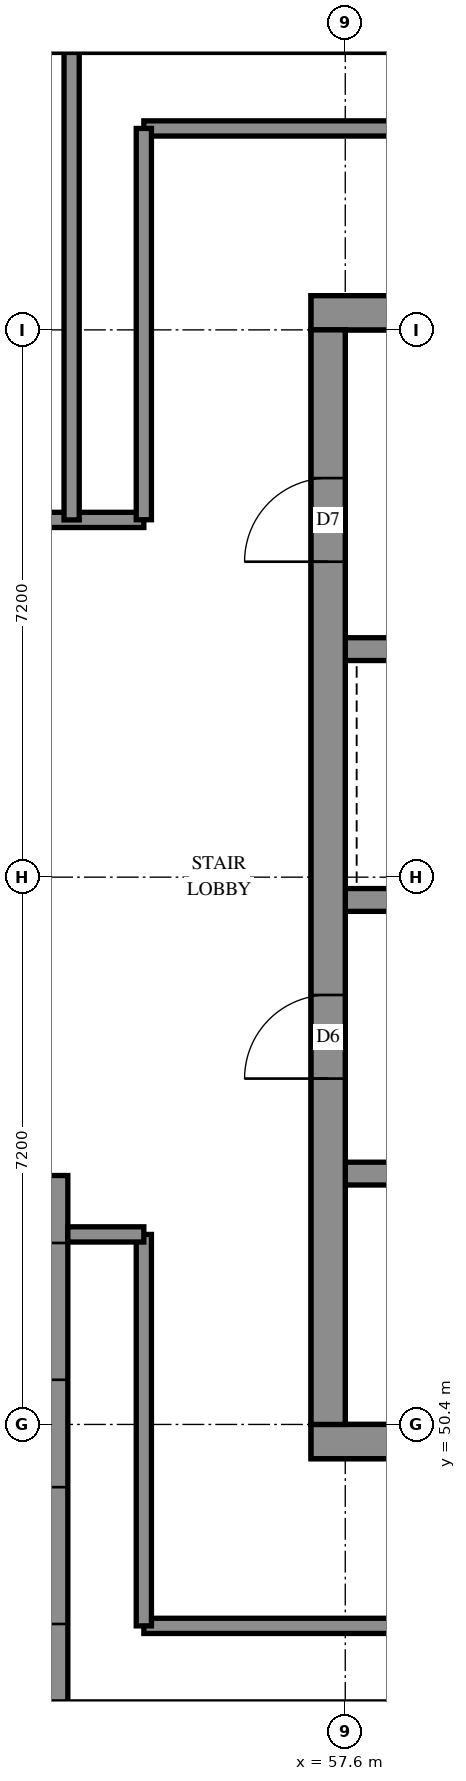
"""IFC4 building model, lengths in metres.
Left out: names, types, materials, properties, quantities, classifications, styles, units other than length and angle.
Written with IfcOpenShell. Run it as: python <this file> out.ifc"""

import sys

from ifc_helpers import new_model, si_unit, direction, frame, frame_2d, origin, place, context, subcontext, project, spatial, polyline, rectangle, outline, extrude, element, fill, save


model = new_model("IFC4")
c1 = context("Model", 3, precision=1e-05, world=origin(), true_north=direction((0.0, 1.0)))
c2 = subcontext(c1, "Body", "Model", "MODEL_VIEW")
j1 = project(units=[si_unit("LENGTHUNIT", "METRE"), si_unit("PLANEANGLEUNIT", "RADIAN")], contexts=[c1])
p1 = place(None, origin())
s1 = spatial("IfcSite", under=j1, at=p1, CompositionType="ELEMENT")
p2 = place(p1, origin())
s2 = spatial("IfcBuilding", under=s1, at=p2, CompositionType="ELEMENT")
p3 = place(p2, frame((0.0, 0.0, 234.6)))
s3 = spatial("IfcBuildingStorey", under=s2, at=p3, CompositionType="ELEMENT", Elevation=234.6)
p4 = place(p3, frame((57.15, 50.175, -0.3), z_axis=(0.0, 0.0, 1.0), x_axis=(1.0, 0.0, 0.0)))
e1 = element("IfcWall", 1, at=p4, inside=s3, PredefinedType="SHEAR", context=c2, shape_type="SweptSolid", body=[
    extrude(rectangle(XDim=15.3, YDim=0.45, at=frame_2d((7.65, 0.0))), origin(), (0.0, 0.0, 1.0), 4.3),
])
p5 = place(p3, frame((57.15, 65.025, -0.3), z_axis=(0.0, 0.0, 1.0), x_axis=(1.0, 0.0, 0.0)))
e2 = element("IfcWall", 2, at=p5, inside=s3, PredefinedType="SHEAR", context=c2, shape_type="SweptSolid", body=[
    extrude(rectangle(XDim=15.3, YDim=0.45, at=frame_2d((7.65, 0.0))), origin(), (0.0, 0.0, 1.0), 4.3),
])
p6 = place(p5, frame((10.45, 0.0, 0.3)))
e3 = element("IfcOpeningElement", 3, at=p6, cuts=e2, PredefinedType="OPENING", context=c2, shape_type="SweptSolid", body=[
    extrude(rectangle(XDim=0.8, YDim=2.1, at=frame_2d((0.4, 1.05))), frame((0.0, 0.235, 0.0), z_axis=(0.0, -1.0, 0.0), x_axis=(1.0, 0.0, 0.0)), (0.0, 0.0, 1.0), 0.47),
])
p7 = place(p3, frame((57.375, 50.4, -0.3), z_axis=(0.0, 0.0, 1.0), x_axis=(0.0, 1.0, 0.0)))
e4 = element("IfcWall", 4, at=p7, inside=s3, PredefinedType="SHEAR", context=c2, shape_type="SweptSolid", body=[
    extrude(rectangle(XDim=14.4, YDim=0.45, at=frame_2d((7.2, 0.0))), origin(), (0.0, 0.0, 1.0), 4.3),
])
p8 = place(p7, frame((4.55, 0.0, 0.3)))
e5 = element("IfcOpeningElement", 5, at=p8, cuts=e4, PredefinedType="OPENING", context=c2, shape_type="SweptSolid", body=[
    extrude(rectangle(XDim=1.1, YDim=2.1, at=frame_2d((0.55, 1.05))), frame((0.0, 0.235, 0.0), z_axis=(0.0, -1.0, 0.0), x_axis=(1.0, 0.0, 0.0)), (0.0, 0.0, 1.0), 0.47),
])
p9 = place(p7, frame((11.35, 0.0, 0.3)))
e6 = element("IfcOpeningElement", 6, at=p9, cuts=e4, PredefinedType="OPENING", context=c2, shape_type="SweptSolid", body=[
    extrude(rectangle(XDim=1.1, YDim=2.1, at=frame_2d((0.55, 1.05))), frame((0.0, 0.235, 0.0), z_axis=(0.0, -1.0, 0.0), x_axis=(1.0, 0.0, 0.0)), (0.0, 0.0, 1.0), 0.47),
])
p10 = place(p3, frame((57.6, 53.7, 0.0), z_axis=(0.0, 0.0, 1.0), x_axis=(1.0, 0.0, 0.0)))
e7 = element("IfcWall", 7, at=p10, inside=s3, PredefinedType="SOLIDWALL", context=c2, shape_type="SweptSolid", body=[
    extrude(rectangle(XDim=14.4, YDim=0.3, at=frame_2d((7.2, 0.0))), origin(), (0.0, 0.0, 1.0), 4.7),
])
p11 = place(p10, frame((1.35, 0.0, 0.0)))
e8 = element("IfcOpeningElement", 8, at=p11, cuts=e7, PredefinedType="OPENING", context=c2, shape_type="SweptSolid", body=[
    extrude(rectangle(XDim=0.9, YDim=2.1, at=frame_2d((0.45, 1.05))), frame((0.0, 0.16, 0.0), z_axis=(0.0, -1.0, 0.0), x_axis=(1.0, 0.0, 0.0)), (0.0, 0.0, 1.0), 0.32),
])
p12 = place(p10, frame((4.95, 0.0, 0.0)))
e9 = element("IfcOpeningElement", 9, at=p12, cuts=e7, PredefinedType="OPENING", context=c2, shape_type="SweptSolid", body=[
    extrude(rectangle(XDim=0.9, YDim=2.1, at=frame_2d((0.45, 1.05))), frame((0.0, 0.16, 0.0), z_axis=(0.0, -1.0, 0.0), x_axis=(1.0, 0.0, 0.0)), (0.0, 0.0, 1.0), 0.32),
])
p13 = place(p10, frame((8.55, 0.0, 0.0)))
e10 = element("IfcOpeningElement", 10, at=p13, cuts=e7, PredefinedType="OPENING", context=c2, shape_type="SweptSolid", body=[
    extrude(rectangle(XDim=0.9, YDim=2.1, at=frame_2d((0.45, 1.05))), frame((0.0, 0.16, 0.0), z_axis=(0.0, -1.0, 0.0), x_axis=(1.0, 0.0, 0.0)), (0.0, 0.0, 1.0), 0.32),
])
p14 = place(p10, frame((12.05, 0.0, 0.0)))
e11 = element("IfcOpeningElement", 11, at=p14, cuts=e7, PredefinedType="OPENING", context=c2, shape_type="SweptSolid", body=[
    extrude(rectangle(XDim=1.1, YDim=2.1, at=frame_2d((0.55, 1.05))), frame((0.0, 0.16, 0.0), z_axis=(0.0, -1.0, 0.0), x_axis=(1.0, 0.0, 0.0)), (0.0, 0.0, 1.0), 0.32),
])
p15 = place(p3, frame((57.6, 57.3, 0.0), z_axis=(0.0, 0.0, 1.0), x_axis=(1.0, 0.0, 0.0)))
e12 = element("IfcWall", 12, at=p15, inside=s3, PredefinedType="SOLIDWALL", context=c2, shape_type="SweptSolid", body=[
    extrude(rectangle(XDim=14.4, YDim=0.3, at=frame_2d((7.2, 0.0))), origin(), (0.0, 0.0, 1.0), 4.7),
])
p16 = place(p15, frame((1.25, 0.0, 0.0)))
e13 = element("IfcOpeningElement", 13, at=p16, cuts=e12, PredefinedType="OPENING", context=c2, shape_type="SweptSolid", body=[
    extrude(rectangle(XDim=1.1, YDim=2.1, at=frame_2d((0.55, 1.05))), frame((0.0, 0.16, 0.0), z_axis=(0.0, -1.0, 0.0), x_axis=(1.0, 0.0, 0.0)), (0.0, 0.0, 1.0), 0.32),
])
p17 = place(p15, frame((4.85, 0.0, 0.0)))
e14 = element("IfcOpeningElement", 14, at=p17, cuts=e12, PredefinedType="OPENING", context=c2, shape_type="SweptSolid", body=[
    extrude(rectangle(XDim=1.1, YDim=2.1, at=frame_2d((0.55, 1.05))), frame((0.0, 0.16, 0.0), z_axis=(0.0, -1.0, 0.0), x_axis=(1.0, 0.0, 0.0)), (0.0, 0.0, 1.0), 0.32),
])
p18 = place(p15, frame((8.45, 0.0, 0.0)))
e15 = element("IfcOpeningElement", 15, at=p18, cuts=e12, PredefinedType="OPENING", context=c2, shape_type="SweptSolid", body=[
    extrude(rectangle(XDim=1.1, YDim=2.1, at=frame_2d((0.55, 1.05))), frame((0.0, 0.16, 0.0), z_axis=(0.0, -1.0, 0.0), x_axis=(1.0, 0.0, 0.0)), (0.0, 0.0, 1.0), 0.32),
])
p19 = place(p15, frame((12.05, 0.0, 0.0)))
e16 = element("IfcOpeningElement", 16, at=p19, cuts=e12, PredefinedType="OPENING", context=c2, shape_type="SweptSolid", body=[
    extrude(rectangle(XDim=1.1, YDim=2.1, at=frame_2d((0.55, 1.05))), frame((0.0, 0.16, 0.0), z_axis=(0.0, -1.0, 0.0), x_axis=(1.0, 0.0, 0.0)), (0.0, 0.0, 1.0), 0.32),
])
p20 = place(p3, frame((57.6, 60.6, 0.0), z_axis=(0.0, 0.0, 1.0), x_axis=(1.0, 0.0, 0.0)))
e17 = element("IfcWall", 17, at=p20, inside=s3, PredefinedType="SOLIDWALL", context=c2, shape_type="SweptSolid", body=[
    extrude(rectangle(XDim=7.2, YDim=0.3, at=frame_2d((3.6, 0.0))), origin(), (0.0, 0.0, 1.0), 4.7),
])
p21 = place(p3, frame((77.844, 68.725, 0.0), z_axis=(0.0, 0.0, 1.0), x_axis=(-1.0, 0.0, 0.0)))
e18 = element("IfcWall", 18, at=p21, inside=s3, PredefinedType="SOLIDWALL", context=c2, shape_type="SweptSolid", body=[
    extrude(outline(polyline([(-0.114, -0.275), (46.044, -0.275), (45.493, 0.275), (0.114, 0.275), (-0.114, -0.275)])), origin(), (0.0, 0.0, 1.0), 4.7),
])
p22 = place(p21, frame((3.193, 0.0, 0.9)))
e19 = element("IfcOpeningElement", 19, at=p22, cuts=e18, PredefinedType="OPENING", context=c2, shape_type="SweptSolid", body=[
    extrude(rectangle(XDim=1.8, YDim=3.6, at=frame_2d((0.9, 1.8))), frame((0.0, 0.285, 0.0), z_axis=(0.0, -1.0, 0.0), x_axis=(1.0, 0.0, 0.0)), (0.0, 0.0, 1.0), 0.57),
])
p23 = place(p21, frame((6.744, 0.0, 0.9)))
e20 = element("IfcOpeningElement", 20, at=p23, cuts=e18, PredefinedType="OPENING", context=c2, shape_type="SweptSolid", body=[
    extrude(rectangle(XDim=1.8, YDim=3.6, at=frame_2d((0.9, 1.8))), frame((0.0, 0.285, 0.0), z_axis=(0.0, -1.0, 0.0), x_axis=(1.0, 0.0, 0.0)), (0.0, 0.0, 1.0), 0.57),
])
p24 = place(p21, frame((10.344, 0.0, 0.9)))
e21 = element("IfcOpeningElement", 21, at=p24, cuts=e18, PredefinedType="OPENING", context=c2, shape_type="SweptSolid", body=[
    extrude(rectangle(XDim=1.8, YDim=3.6, at=frame_2d((0.9, 1.8))), frame((0.0, 0.285, 0.0), z_axis=(0.0, -1.0, 0.0), x_axis=(1.0, 0.0, 0.0)), (0.0, 0.0, 1.0), 0.57),
])
p25 = place(p21, frame((13.944, 0.0, 0.9)))
e22 = element("IfcOpeningElement", 22, at=p25, cuts=e18, PredefinedType="OPENING", context=c2, shape_type="SweptSolid", body=[
    extrude(rectangle(XDim=1.8, YDim=3.6, at=frame_2d((0.9, 1.8))), frame((0.0, 0.285, 0.0), z_axis=(0.0, -1.0, 0.0), x_axis=(1.0, 0.0, 0.0)), (0.0, 0.0, 1.0), 0.57),
])
p26 = place(p21, frame((17.544, 0.0, 0.9)))
e23 = element("IfcOpeningElement", 23, at=p26, cuts=e18, PredefinedType="OPENING", context=c2, shape_type="SweptSolid", body=[
    extrude(rectangle(XDim=1.8, YDim=3.6, at=frame_2d((0.9, 1.8))), frame((0.0, 0.285, 0.0), z_axis=(0.0, -1.0, 0.0), x_axis=(1.0, 0.0, 0.0)), (0.0, 0.0, 1.0), 0.57),
])
p27 = place(p21, frame((21.143, 0.0, 0.9)))
e24 = element("IfcOpeningElement", 24, at=p27, cuts=e18, PredefinedType="OPENING", context=c2, shape_type="SweptSolid", body=[
    extrude(rectangle(XDim=1.8, YDim=3.6, at=frame_2d((0.9, 1.8))), frame((0.0, 0.285, 0.0), z_axis=(0.0, -1.0, 0.0), x_axis=(1.0, 0.0, 0.0)), (0.0, 0.0, 1.0), 0.57),
])
p28 = place(p21, frame((24.744, 0.0, 0.9)))
e25 = element("IfcOpeningElement", 25, at=p28, cuts=e18, PredefinedType="OPENING", context=c2, shape_type="SweptSolid", body=[
    extrude(rectangle(XDim=1.8, YDim=3.6, at=frame_2d((0.9, 1.8))), frame((0.0, 0.285, 0.0), z_axis=(0.0, -1.0, 0.0), x_axis=(1.0, 0.0, 0.0)), (0.0, 0.0, 1.0), 0.57),
])
p29 = place(p21, frame((28.343, 0.0, 0.9)))
e26 = element("IfcOpeningElement", 26, at=p29, cuts=e18, PredefinedType="OPENING", context=c2, shape_type="SweptSolid", body=[
    extrude(rectangle(XDim=1.8, YDim=3.6, at=frame_2d((0.9, 1.8))), frame((0.0, 0.285, 0.0), z_axis=(0.0, -1.0, 0.0), x_axis=(1.0, 0.0, 0.0)), (0.0, 0.0, 1.0), 0.57),
])
p30 = place(p21, frame((31.944, 0.0, 0.9)))
e27 = element("IfcOpeningElement", 27, at=p30, cuts=e18, PredefinedType="OPENING", context=c2, shape_type="SweptSolid", body=[
    extrude(rectangle(XDim=1.8, YDim=3.6, at=frame_2d((0.9, 1.8))), frame((0.0, 0.285, 0.0), z_axis=(0.0, -1.0, 0.0), x_axis=(1.0, 0.0, 0.0)), (0.0, 0.0, 1.0), 0.57),
])
p31 = place(p21, frame((35.544, 0.0, 0.9)))
e28 = element("IfcOpeningElement", 28, at=p31, cuts=e18, PredefinedType="OPENING", context=c2, shape_type="SweptSolid", body=[
    extrude(rectangle(XDim=1.8, YDim=3.6, at=frame_2d((0.9, 1.8))), frame((0.0, 0.285, 0.0), z_axis=(0.0, -1.0, 0.0), x_axis=(1.0, 0.0, 0.0)), (0.0, 0.0, 1.0), 0.57),
])
p32 = place(p3, frame((46.475, 53.675, 0.0), z_axis=(0.0, 0.0, 1.0), x_axis=(1.0, 0.0, 0.0)))
e29 = element("IfcWall", 29, at=p32, inside=s3, PredefinedType="SOLIDWALL", context=c2, shape_type="SweptSolid", body=[
    extrude(outline(polyline([(-0.275, -0.275), (6.925, -0.275), (7.475, 0.275), (0.275, 0.275), (-0.275, -0.275)])), origin(), (0.0, 0.0, 1.0), 4.7),
])
p33 = place(p32, frame((1.3, 0.0, 0.9)))
e30 = element("IfcOpeningElement", 30, at=p33, cuts=e29, PredefinedType="OPENING", context=c2, shape_type="SweptSolid", body=[
    extrude(rectangle(XDim=1.8, YDim=3.6, at=frame_2d((0.9, 1.8))), frame((0.0, 0.285, 0.0), z_axis=(0.0, -1.0, 0.0), x_axis=(1.0, 0.0, 0.0)), (0.0, 0.0, 1.0), 0.57),
])
p34 = place(p32, frame((4.562, 0.0, 0.9)))
e31 = element("IfcOpeningElement", 31, at=p34, cuts=e29, PredefinedType="OPENING", context=c2, shape_type="SweptSolid", body=[
    extrude(rectangle(XDim=1.8, YDim=3.6, at=frame_2d((0.9, 1.8))), frame((0.0, 0.285, 0.0), z_axis=(0.0, -1.0, 0.0), x_axis=(1.0, 0.0, 0.0)), (0.0, 0.0, 1.0), 0.57),
])
p35 = place(p3, frame((53.675, 53.675, 0.0), z_axis=(0.0, 0.0, 1.0), x_axis=(0.0, -1.0, 0.0)))
e32 = element("IfcWall", 32, at=p35, inside=s3, PredefinedType="SOLIDWALL", context=c2, shape_type="SweptSolid", body=[
    extrude(outline(polyline([(0.275, -0.275), (7.475, -0.275), (6.925, 0.275), (-0.275, 0.275), (0.275, -0.275)])), origin(), (0.0, 0.0, 1.0), 4.7),
])
p36 = place(p35, frame((0.887, 0.0, 0.9)))
e33 = element("IfcOpeningElement", 33, at=p36, cuts=e32, PredefinedType="OPENING", context=c2, shape_type="SweptSolid", body=[
    extrude(rectangle(XDim=1.8, YDim=3.6, at=frame_2d((0.9, 1.8))), frame((0.0, 0.285, 0.0), z_axis=(0.0, -1.0, 0.0), x_axis=(1.0, 0.0, 0.0)), (0.0, 0.0, 1.0), 0.57),
])
p37 = place(p35, frame((4.1, 0.0, 0.9)))
e34 = element("IfcOpeningElement", 34, at=p37, cuts=e32, PredefinedType="OPENING", context=c2, shape_type="SweptSolid", body=[
    extrude(rectangle(XDim=1.8, YDim=3.6, at=frame_2d((0.9, 1.8))), frame((0.0, 0.285, 0.0), z_axis=(0.0, -1.0, 0.0), x_axis=(1.0, 0.0, 0.0)), (0.0, 0.0, 1.0), 0.57),
])
p38 = place(p3, frame((54.95, 67.45, 0.0), z_axis=(0.0, 0.0, 1.0), x_axis=(1.0, 0.0, 0.0)))
e35 = element("IfcWall", 35, at=p38, inside=s3, PredefinedType="PARTITIONING", context=c2, shape_type="SweptSolid", body=[
    extrude(rectangle(XDim=19.7, YDim=0.2, at=frame_2d((9.85, 0.0))), origin(), (0.0, 0.0, 1.0), 4.7),
])
p39 = place(p3, frame((54.95, 47.75, 0.0), z_axis=(0.0, 0.0, 1.0), x_axis=(1.0, 0.0, 0.0)))
e36 = element("IfcWall", 36, at=p39, inside=s3, PredefinedType="PARTITIONING", context=c2, shape_type="SweptSolid", body=[
    extrude(rectangle(XDim=19.296, YDim=0.2, at=frame_2d((9.648, 0.0))), origin(), (0.0, 0.0, 1.0), 4.7),
])
p40 = place(p3, frame((40.702, 62.3, 0.0), z_axis=(0.0, 0.0, 1.0), x_axis=(1.0, 0.0, 0.0)))
e37 = element("IfcWall", 37, at=p40, inside=s3, PredefinedType="PARTITIONING", context=c2, shape_type="SweptSolid", body=[
    extrude(rectangle(XDim=14.248, YDim=0.2, at=frame_2d((7.124, 0.0))), origin(), (0.0, 0.0, 1.0), 4.7),
])
p41 = place(p40, frame((6.361, 0.0, 0.0)))
e38 = element("IfcOpeningElement", 38, at=p41, cuts=e37, PredefinedType="OPENING", context=c2, shape_type="SweptSolid", body=[
    extrude(rectangle(XDim=1.0, YDim=2.1, at=frame_2d((0.5, 1.05))), frame((0.0, 0.11, 0.0), z_axis=(0.0, -1.0, 0.0), x_axis=(1.0, 0.0, 0.0)), (0.0, 0.0, 1.0), 0.22),
])
p42 = place(p40, frame((11.79, 0.0, 0.0)))
e39 = element("IfcOpeningElement", 39, at=p42, cuts=e37, PredefinedType="OPENING", context=c2, shape_type="SweptSolid", body=[
    extrude(rectangle(XDim=1.0, YDim=2.1, at=frame_2d((0.5, 1.05))), frame((0.0, 0.11, 0.0), z_axis=(0.0, -1.0, 0.0), x_axis=(1.0, 0.0, 0.0)), (0.0, 0.0, 1.0), 0.22),
])
p43 = place(p3, frame((54.0, 62.3, 0.0), z_axis=(0.0, 0.0, 1.0), x_axis=(0.0, 1.0, 0.0)))
e40 = element("IfcWall", 40, at=p43, inside=s3, PredefinedType="PARTITIONING", context=c2, shape_type="SweptSolid", body=[
    extrude(rectangle(XDim=6.15, YDim=0.2, at=frame_2d((3.075, 0.0))), origin(), (0.0, 0.0, 1.0), 4.7),
])
p44 = place(p3, frame((54.95, 47.75, 0.0), z_axis=(0.0, 0.0, 1.0), x_axis=(0.0, 1.0, 0.0)))
e41 = element("IfcWall", 41, at=p44, inside=s3, PredefinedType="PARTITIONING", context=c2, shape_type="SweptSolid", body=[
    extrude(rectangle(XDim=5.15, YDim=0.2, at=frame_2d((2.575, 0.0))), origin(), (0.0, 0.0, 1.0), 4.7),
])
p45 = place(p3, frame((54.95, 62.302, 0.0), z_axis=(0.0, 0.0, 1.0), x_axis=(0.0, 1.0, 0.0)))
e42 = element("IfcWall", 42, at=p45, inside=s3, PredefinedType="PARTITIONING", context=c2, shape_type="SweptSolid", body=[
    extrude(rectangle(XDim=5.148, YDim=0.2, at=frame_2d((2.574, 0.0))), origin(), (0.0, 0.0, 1.0), 4.7),
])
p46 = place(p3, frame((53.95, 52.9, 0.0), z_axis=(0.0, 0.0, 1.0), x_axis=(1.0, 0.0, 0.0)))
e43 = element("IfcWall", 43, at=p46, inside=s3, PredefinedType="PARTITIONING", context=c2, shape_type="SweptSolid", body=[
    extrude(rectangle(XDim=1.0, YDim=0.2, at=frame_2d((0.5, 0.0))), origin(), (0.0, 0.0, 1.0), 4.7),
])
p47 = place(p36, origin())
e44 = element("IfcWindow", 44, at=p47, inside=s3, PartitioningType="SINGLE_PANEL", PredefinedType="WINDOW", context=c2, shape_type="SweptSolid", body=[
    extrude(rectangle(XDim=1.8, YDim=3.6, at=frame_2d((0.9, 1.8))), frame((0.0, 0.155, 0.0), z_axis=(0.0, -1.0, 0.0), x_axis=(1.0, 0.0, 0.0)), (0.0, 0.0, 1.0), 0.06),
])
fill(e33, e44)
p48 = place(p37, origin())
e45 = element("IfcWindow", 45, at=p48, inside=s3, PartitioningType="SINGLE_PANEL", PredefinedType="WINDOW", context=c2, shape_type="SweptSolid", body=[
    extrude(rectangle(XDim=1.8, YDim=3.6, at=frame_2d((0.9, 1.8))), frame((0.0, 0.155, 0.0), z_axis=(0.0, -1.0, 0.0), x_axis=(1.0, 0.0, 0.0)), (0.0, 0.0, 1.0), 0.06),
])
fill(e34, e45)
p49 = place(p8, origin())
e46 = element("IfcDoor", 46, at=p49, inside=s3, OperationType="DOUBLE_DOOR_SINGLE_SWING", PredefinedType="DOOR", context=c2, shape_type="SweptSolid", body=[
    extrude(rectangle(XDim=1.1, YDim=2.1, at=frame_2d((0.55, 1.05))), frame((0.0, 0.025, 0.0), z_axis=(0.0, -1.0, 0.0), x_axis=(1.0, 0.0, 0.0)), (0.0, 0.0, 1.0), 0.05),
])
fill(e5, e46)
p50 = place(p9, origin())
e47 = element("IfcDoor", 47, at=p50, inside=s3, OperationType="SINGLE_SWING_LEFT", PredefinedType="DOOR", context=c2, shape_type="SweptSolid", body=[
    extrude(rectangle(XDim=1.1, YDim=2.1, at=frame_2d((0.55, 1.05))), frame((0.0, 0.025, 0.0), z_axis=(0.0, -1.0, 0.0), x_axis=(1.0, 0.0, 0.0)), (0.0, 0.0, 1.0), 0.05),
])
fill(e6, e47)
save(model, sys.argv[1])
